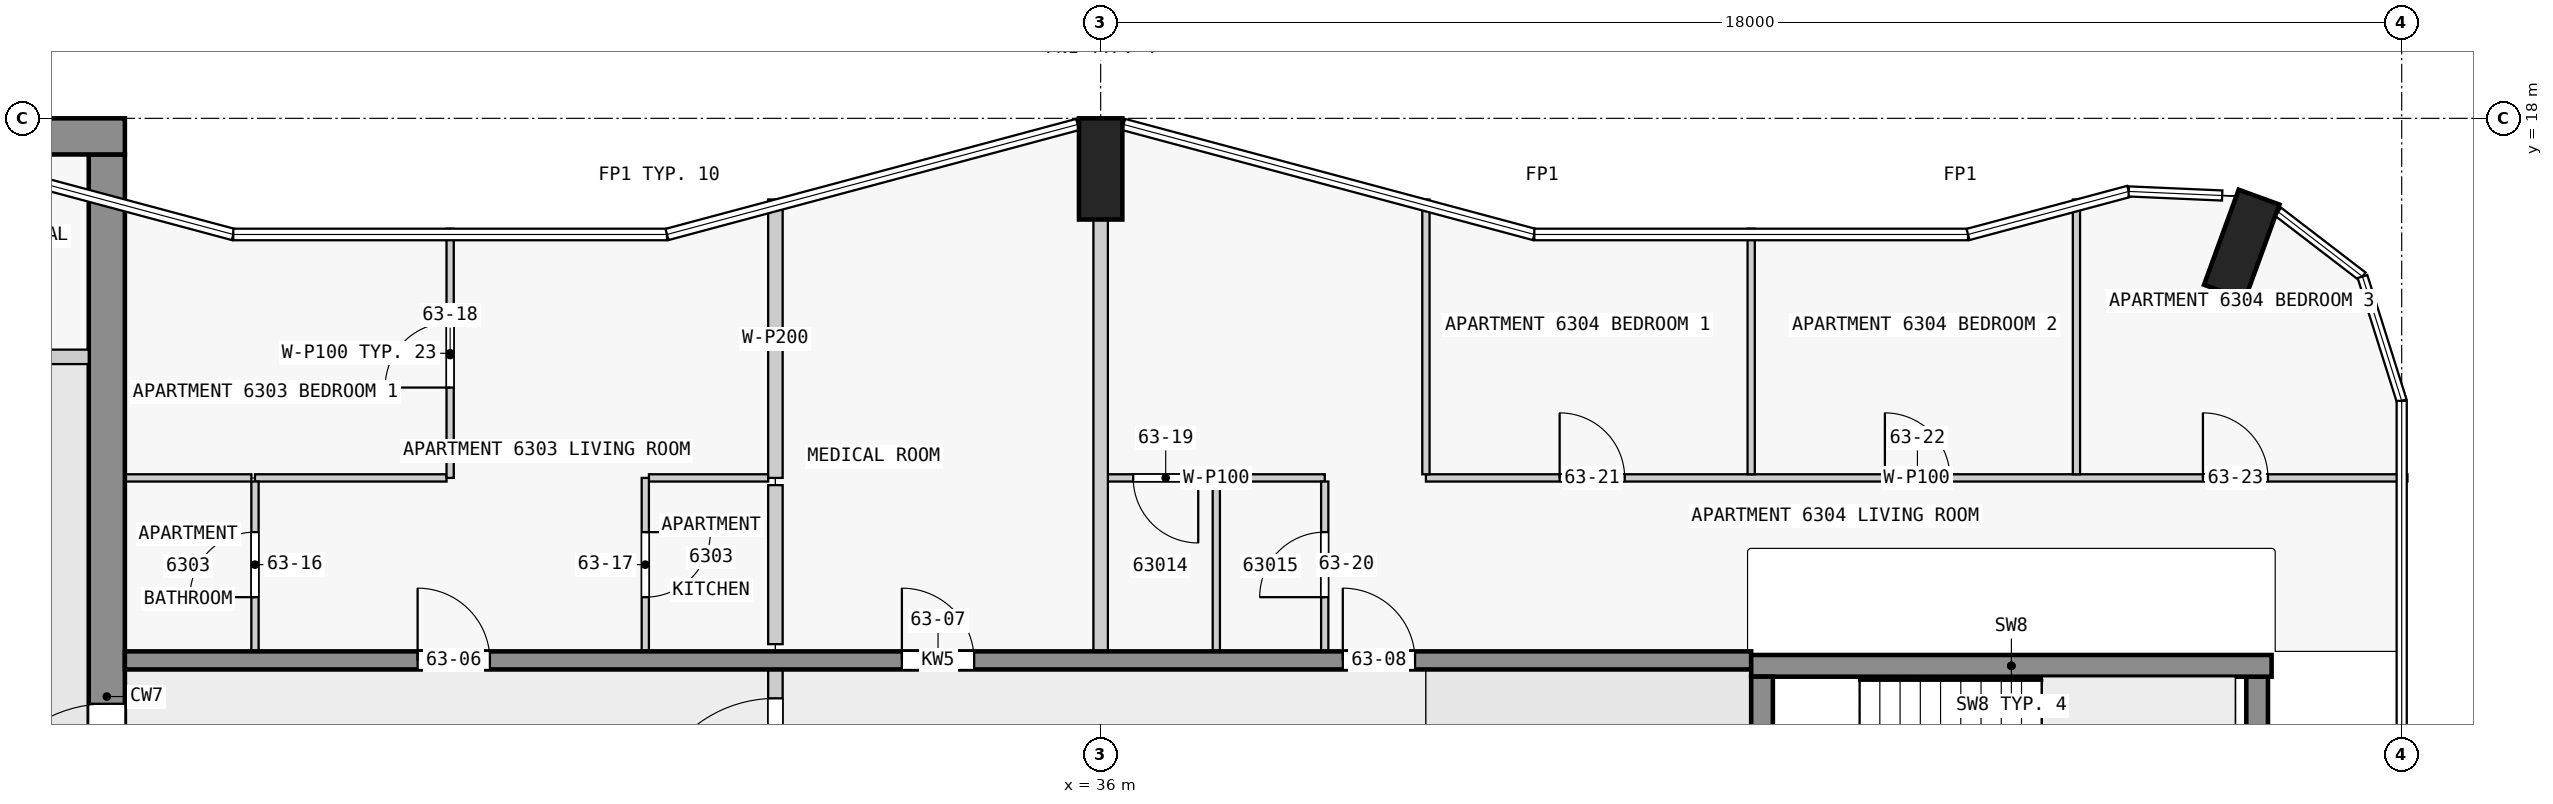
"""IFC4 building model, lengths in metres.
Left out: names, types, materials, properties, quantities, classifications, styles, units other than length and angle.
Written with IfcOpenShell. Run it as: python <this file> out.ifc"""

import sys

from ifc_helpers import new_model, si_unit, direction, frame, frame_2d, origin, origin_2d, place, context, subcontext, project, spatial, rectangle, extrude, element, fill, save


model = new_model("IFC4")
c1 = context("Model", 3, precision=1e-05, world=origin(), true_north=direction((0.0, 1.0)))
c2 = subcontext(c1, "Body", "Model", "MODEL_VIEW")
j1 = project(units=[si_unit("LENGTHUNIT", "METRE"), si_unit("PLANEANGLEUNIT", "RADIAN")], contexts=[c1])
p1 = place(None, origin())
s1 = spatial("IfcSite", under=j1, at=p1, CompositionType="ELEMENT")
p2 = place(p1, origin())
s2 = spatial("IfcBuilding", under=s1, at=p2, CompositionType="ELEMENT")
p3 = place(p2, frame((0.0, 0.0, 242.4)))
s3 = spatial("IfcBuildingStorey", under=s2, at=p3, CompositionType="ELEMENT", Elevation=242.4)
for number, where, z_axis, x_axis in (
    (1, (51.787, 16.252, 0.0), (0.0, 0.0, 1.0), (-0.94, 0.342, 0.0)),
    (2, (36.0, 17.3, 0.0), (0.0, 0.0, 1.0), (1.0, 0.0, 0.0)),
):
    element("IfcColumn", number, at=place(p3, frame(where, z_axis=z_axis, x_axis=x_axis)), inside=s3, PredefinedType="COLUMN", context=c2, shape_type="SweptSolid", body=[
        extrude(rectangle(XDim=0.6, YDim=1.4, at=origin_2d()), origin(), (0.0, 0.0, 1.0), 3.5),
    ])
p4 = place(p3, frame((1.8, 17.75, 0.0), z_axis=(0.0, 0.0, 1.0), x_axis=(1.0, 0.0, 0.0)))
e3 = element("IfcWall", 3, at=p4, inside=s3, PredefinedType="SHEAR", context=c2, shape_type="SweptSolid", body=[
    extrude(rectangle(XDim=20.7, YDim=0.5, at=frame_2d((10.35, 0.0))), origin(), (0.0, 0.0, 1.0), 3.25),
])
p5 = place(p3, frame((22.25, 2.5, 0.0), z_axis=(0.0, 0.0, 1.0), x_axis=(0.0, 1.0, 0.0)))
e4 = element("IfcWall", 4, at=p5, inside=s3, PredefinedType="SHEAR", context=c2, shape_type="SweptSolid", body=[
    extrude(rectangle(XDim=15.0, YDim=0.5, at=frame_2d((7.5, 0.0))), origin(), (0.0, 0.0, 1.0), 3.25),
])
p6 = place(p5, frame((5.6, 0.0, 0.0)))
e5 = element("IfcOpeningElement", 5, at=p6, cuts=e4, PredefinedType="OPENING", context=c2, shape_type="SweptSolid", body=[
    extrude(rectangle(XDim=1.8, YDim=2.1, at=frame_2d((0.9, 1.05))), frame((0.0, 0.26, 0.0), z_axis=(0.0, -1.0, 0.0), x_axis=(1.0, 0.0, 0.0)), (0.0, 0.0, 1.0), 0.52),
])
p7 = place(p3, frame((45.15, 7.725, 0.0), z_axis=(0.0, 0.0, 1.0), x_axis=(0.0, 1.0, 0.0)))
e6 = element("IfcWall", 6, at=p7, inside=s3, PredefinedType="SHEAR", context=c2, shape_type="SweptSolid", body=[
    extrude(rectangle(XDim=2.55, YDim=0.3, at=frame_2d((1.275, 0.0))), origin(), (0.0, 0.0, 1.0), 3.5),
])
p8 = place(p7, frame((0.725, 0.0, 0.0)))
e7 = element("IfcOpeningElement", 7, at=p8, cuts=e6, PredefinedType="OPENING", context=c2, shape_type="SweptSolid", body=[
    extrude(rectangle(XDim=1.1, YDim=2.1, at=frame_2d((0.55, 1.05))), frame((0.0, 0.16, 0.0), z_axis=(0.0, -1.0, 0.0), x_axis=(1.0, 0.0, 0.0)), (0.0, 0.0, 1.0), 0.32),
])
p9 = place(p3, frame((52.0, 7.725, 0.0), z_axis=(0.0, 0.0, 1.0), x_axis=(0.0, 1.0, 0.0)))
e8 = element("IfcWall", 8, at=p9, inside=s3, PredefinedType="SHEAR", context=c2, shape_type="SweptSolid", body=[
    extrude(rectangle(XDim=2.55, YDim=0.3, at=frame_2d((1.275, 0.0))), origin(), (0.0, 0.0, 1.0), 3.5),
])
p10 = place(p3, frame((45.0, 10.425, 0.0), z_axis=(0.0, 0.0, 1.0), x_axis=(1.0, 0.0, 0.0)))
e9 = element("IfcWall", 9, at=p10, inside=s3, PredefinedType="SHEAR", context=c2, shape_type="SweptSolid", body=[
    extrude(rectangle(XDim=7.2, YDim=0.3, at=frame_2d((3.6, 0.0))), origin(), (0.0, 0.0, 1.0), 3.5),
])
p11 = place(p3, frame((22.5, 10.5, 0.0), z_axis=(0.0, 0.0, 1.0), x_axis=(1.0, 0.0, 0.0)))
e10 = element("IfcWall", 10, at=p11, inside=s3, PredefinedType="SHEAR", context=c2, shape_type="SweptSolid", body=[
    extrude(rectangle(XDim=22.5, YDim=0.25, at=frame_2d((11.25, 0.0))), origin(), (0.0, 0.0, 1.0), 3.25),
])
p12 = place(p11, frame((4.05, 0.0, 0.0)))
e11 = element("IfcOpeningElement", 11, at=p12, cuts=e10, PredefinedType="OPENING", context=c2, shape_type="SweptSolid", body=[
    extrude(rectangle(XDim=1.0, YDim=2.1, at=frame_2d((0.5, 1.05))), frame((0.0, 0.135, 0.0), z_axis=(0.0, -1.0, 0.0), x_axis=(1.0, 0.0, 0.0)), (0.0, 0.0, 1.0), 0.27),
])
p13 = place(p11, frame((10.75, 0.0, 0.0)))
e12 = element("IfcOpeningElement", 12, at=p13, cuts=e10, PredefinedType="OPENING", context=c2, shape_type="SweptSolid", body=[
    extrude(rectangle(XDim=1.0, YDim=2.1, at=frame_2d((0.5, 1.05))), frame((0.0, 0.135, 0.0), z_axis=(0.0, -1.0, 0.0), x_axis=(1.0, 0.0, 0.0)), (0.0, 0.0, 1.0), 0.27),
])
p14 = place(p11, frame((16.85, 0.0, 0.0)))
e13 = element("IfcOpeningElement", 13, at=p14, cuts=e10, PredefinedType="OPENING", context=c2, shape_type="SweptSolid", body=[
    extrude(rectangle(XDim=1.0, YDim=2.1, at=frame_2d((0.5, 1.05))), frame((0.0, 0.135, 0.0), z_axis=(0.0, -1.0, 0.0), x_axis=(1.0, 0.0, 0.0)), (0.0, 0.0, 1.0), 0.27),
])
p15 = place(p3, frame((18.6, 14.7, 0.0), z_axis=(0.0, 0.0, 1.0), x_axis=(1.0, 0.0, 0.0)))
e14 = element("IfcWall", 14, at=p15, inside=s3, PredefinedType="PARTITIONING", context=c2, shape_type="SweptSolid", body=[
    extrude(rectangle(XDim=3.4, YDim=0.2, at=frame_2d((1.7, 0.0))), origin(), (0.0, 0.0, 1.0), 3.25),
])
p16 = place(p15, frame((0.15, 0.0, 0.0)))
e15 = element("IfcOpeningElement", 15, at=p16, cuts=e14, PredefinedType="OPENING", context=c2, shape_type="SweptSolid", body=[
    extrude(rectangle(XDim=0.9, YDim=2.1, at=frame_2d((0.45, 1.05))), frame((0.0, 0.11, 0.0), z_axis=(0.0, -1.0, 0.0), x_axis=(1.0, 0.0, 0.0)), (0.0, 0.0, 1.0), 0.22),
])
p17 = place(p15, frame((1.85, 0.0, 0.0)))
e16 = element("IfcOpeningElement", 16, at=p17, cuts=e14, PredefinedType="OPENING", context=c2, shape_type="SweptSolid", body=[
    extrude(rectangle(XDim=0.9, YDim=2.1, at=frame_2d((0.45, 1.05))), frame((0.0, 0.11, 0.0), z_axis=(0.0, -1.0, 0.0), x_axis=(1.0, 0.0, 0.0)), (0.0, 0.0, 1.0), 0.22),
])
p18 = place(p3, frame((24.25, 13.025, 0.0), z_axis=(0.0, 0.0, 1.0), x_axis=(-1.0, 0.0, 0.0)))
e17 = element("IfcWall", 17, at=p18, inside=s3, PredefinedType="PARTITIONING", context=c2, shape_type="SweptSolid", body=[
    extrude(rectangle(XDim=1.75, YDim=0.1, at=frame_2d((0.875, 0.0))), origin(), (0.0, 0.0, 1.0), 3.25),
])
p19 = place(p3, frame((31.4, 13.025, 0.0), z_axis=(0.0, 0.0, 1.0), x_axis=(-1.0, 0.0, 0.0)))
e18 = element("IfcWall", 18, at=p19, inside=s3, PredefinedType="PARTITIONING", context=c2, shape_type="SweptSolid", body=[
    extrude(rectangle(XDim=1.65, YDim=0.1, at=frame_2d((0.825, 0.0))), origin(), (0.0, 0.0, 1.0), 3.25),
])
p20 = place(p3, frame((39.1, 13.025, 0.0), z_axis=(0.0, 0.0, 1.0), x_axis=(-1.0, 0.0, 0.0)))
e19 = element("IfcWall", 19, at=p20, inside=s3, PredefinedType="PARTITIONING", context=c2, shape_type="SweptSolid", body=[
    extrude(rectangle(XDim=3.0, YDim=0.1, at=frame_2d((1.5, 0.0))), origin(), (0.0, 0.0, 1.0), 3.25),
])
p21 = place(p20, frame((1.75, 0.0, 0.0)))
e20 = element("IfcOpeningElement", 20, at=p21, cuts=e19, PredefinedType="OPENING", context=c2, shape_type="SweptSolid", body=[
    extrude(rectangle(XDim=0.9, YDim=2.1, at=frame_2d((0.45, 1.05))), frame((0.0, 0.06, 0.0), z_axis=(0.0, -1.0, 0.0), x_axis=(1.0, 0.0, 0.0)), (0.0, 0.0, 1.0), 0.12),
])
p22 = place(p3, frame((24.3, 13.025, 0.0), z_axis=(0.0, 0.0, 1.0), x_axis=(1.0, 0.0, 0.0)))
e21 = element("IfcWall", 21, at=p22, inside=s3, PredefinedType="PARTITIONING", context=c2, shape_type="SweptSolid", body=[
    extrude(rectangle(XDim=2.65, YDim=0.1, at=frame_2d((1.325, 0.0))), origin(), (0.0, 0.0, 1.0), 3.25),
])
p23 = place(p3, frame((40.5, 13.025, 0.0), z_axis=(0.0, 0.0, 1.0), x_axis=(1.0, 0.0, 0.0)))
e22 = element("IfcWall", 22, at=p23, inside=s3, PredefinedType="PARTITIONING", context=c2, shape_type="SweptSolid", body=[
    extrude(rectangle(XDim=13.58, YDim=0.1, at=frame_2d((6.79, 0.0))), origin(), (0.0, 0.0, 1.0), 3.25),
])
p24 = place(p23, frame((1.85, 0.0, 0.0)))
e23 = element("IfcOpeningElement", 23, at=p24, cuts=e22, PredefinedType="OPENING", context=c2, shape_type="SweptSolid", body=[
    extrude(rectangle(XDim=0.9, YDim=2.1, at=frame_2d((0.45, 1.05))), frame((0.0, 0.06, 0.0), z_axis=(0.0, -1.0, 0.0), x_axis=(1.0, 0.0, 0.0)), (0.0, 0.0, 1.0), 0.12),
])
p25 = place(p23, frame((6.35, 0.0, 0.0)))
e24 = element("IfcOpeningElement", 24, at=p25, cuts=e22, PredefinedType="OPENING", context=c2, shape_type="SweptSolid", body=[
    extrude(rectangle(XDim=0.9, YDim=2.1, at=frame_2d((0.45, 1.05))), frame((0.0, 0.06, 0.0), z_axis=(0.0, -1.0, 0.0), x_axis=(1.0, 0.0, 0.0)), (0.0, 0.0, 1.0), 0.12),
])
p26 = place(p23, frame((10.75, 0.0, 0.0)))
e25 = element("IfcOpeningElement", 25, at=p26, cuts=e22, PredefinedType="OPENING", context=c2, shape_type="SweptSolid", body=[
    extrude(rectangle(XDim=0.9, YDim=2.1, at=frame_2d((0.45, 1.05))), frame((0.0, 0.06, 0.0), z_axis=(0.0, -1.0, 0.0), x_axis=(1.0, 0.0, 0.0)), (0.0, 0.0, 1.0), 0.12),
])
p27 = place(p3, frame((24.3, 10.625, 0.0), z_axis=(0.0, 0.0, 1.0), x_axis=(0.0, 1.0, 0.0)))
e26 = element("IfcWall", 26, at=p27, inside=s3, PredefinedType="PARTITIONING", context=c2, shape_type="SweptSolid", body=[
    extrude(rectangle(XDim=2.35, YDim=0.1, at=frame_2d((1.175, 0.0))), origin(), (0.0, 0.0, 1.0), 3.25),
])
p28 = place(p27, frame((0.75, 0.0, 0.0)))
e27 = element("IfcOpeningElement", 27, at=p28, cuts=e26, PredefinedType="OPENING", context=c2, shape_type="SweptSolid", body=[
    extrude(rectangle(XDim=0.9, YDim=2.1, at=frame_2d((0.45, 1.05))), frame((0.0, 0.06, 0.0), z_axis=(0.0, -1.0, 0.0), x_axis=(1.0, 0.0, 0.0)), (0.0, 0.0, 1.0), 0.12),
])
p29 = place(p3, frame((27.0, 13.025, 0.0), z_axis=(0.0, 0.0, 1.0), x_axis=(0.0, 1.0, 0.0)))
e28 = element("IfcWall", 28, at=p29, inside=s3, PredefinedType="PARTITIONING", context=c2, shape_type="SweptSolid", body=[
    extrude(rectangle(XDim=3.448, YDim=0.1, at=frame_2d((1.724, 0.0))), origin(), (0.0, 0.0, 1.0), 3.25),
])
p30 = place(p29, frame((1.25, 0.0, 0.0)))
e29 = element("IfcOpeningElement", 29, at=p30, cuts=e28, PredefinedType="OPENING", context=c2, shape_type="SweptSolid", body=[
    extrude(rectangle(XDim=0.9, YDim=2.1, at=frame_2d((0.45, 1.05))), frame((0.0, 0.06, 0.0), z_axis=(0.0, -1.0, 0.0), x_axis=(1.0, 0.0, 0.0)), (0.0, 0.0, 1.0), 0.12),
])
p31 = place(p3, frame((29.7, 13.025, 0.0), z_axis=(0.0, 0.0, 1.0), x_axis=(0.0, -1.0, 0.0)))
e30 = element("IfcWall", 30, at=p31, inside=s3, PredefinedType="PARTITIONING", context=c2, shape_type="SweptSolid", body=[
    extrude(rectangle(XDim=2.4, YDim=0.1, at=frame_2d((1.2, 0.0))), origin(), (0.0, 0.0, 1.0), 3.25),
])
p32 = place(p31, frame((0.75, 0.0, 0.0)))
e31 = element("IfcOpeningElement", 31, at=p32, cuts=e30, PredefinedType="OPENING", context=c2, shape_type="SweptSolid", body=[
    extrude(rectangle(XDim=0.9, YDim=2.1, at=frame_2d((0.45, 1.05))), frame((0.0, 0.06, 0.0), z_axis=(0.0, -1.0, 0.0), x_axis=(1.0, 0.0, 0.0)), (0.0, 0.0, 1.0), 0.12),
])
p33 = place(p3, frame((31.5, 16.878, 0.0), z_axis=(0.0, 0.0, 1.0), x_axis=(0.0, -1.0, 0.0)))
e32 = element("IfcWall", 32, at=p33, inside=s3, PredefinedType="PARTITIONING", context=c2, shape_type="SweptSolid", body=[
    extrude(rectangle(XDim=3.853, YDim=0.2, at=frame_2d((1.926, 0.0))), origin(), (0.0, 0.0, 1.0), 3.25),
])
p34 = place(p3, frame((31.5, 10.725, 0.0), z_axis=(0.0, 0.0, 1.0), x_axis=(0.0, 1.0, 0.0)))
e33 = element("IfcWall", 33, at=p34, inside=s3, PredefinedType="PARTITIONING", context=c2, shape_type="SweptSolid", body=[
    extrude(rectangle(XDim=2.2, YDim=0.2, at=frame_2d((1.1, 0.0))), origin(), (0.0, 0.0, 1.0), 3.25),
])
p35 = place(p3, frame((36.0, 10.625, 0.0), z_axis=(0.0, 0.0, 1.0), x_axis=(0.0, 1.0, 0.0)))
e34 = element("IfcWall", 34, at=p35, inside=s3, PredefinedType="PARTITIONING", context=c2, shape_type="SweptSolid", body=[
    extrude(rectangle(XDim=5.975, YDim=0.2, at=frame_2d((2.988, 0.0))), origin(), (0.0, 0.0, 1.0), 3.25),
])
p36 = place(p3, frame((37.6, 10.625, 0.0), z_axis=(0.0, 0.0, 1.0), x_axis=(0.0, 1.0, 0.0)))
e35 = element("IfcWall", 35, at=p36, inside=s3, PredefinedType="PARTITIONING", context=c2, shape_type="SweptSolid", body=[
    extrude(rectangle(XDim=2.35, YDim=0.1, at=frame_2d((1.175, 0.0))), origin(), (0.0, 0.0, 1.0), 3.25),
])
p37 = place(p3, frame((39.1, 10.625, 0.0), z_axis=(0.0, 0.0, 1.0), x_axis=(0.0, 1.0, 0.0)))
e36 = element("IfcWall", 36, at=p37, inside=s3, PredefinedType="PARTITIONING", context=c2, shape_type="SweptSolid", body=[
    extrude(rectangle(XDim=2.35, YDim=0.1, at=frame_2d((1.175, 0.0))), origin(), (0.0, 0.0, 1.0), 3.25),
])
p38 = place(p37, frame((0.75, 0.0, 0.0)))
e37 = element("IfcOpeningElement", 37, at=p38, cuts=e36, PredefinedType="OPENING", context=c2, shape_type="SweptSolid", body=[
    extrude(rectangle(XDim=0.9, YDim=2.1, at=frame_2d((0.45, 1.05))), frame((0.0, 0.06, 0.0), z_axis=(0.0, -1.0, 0.0), x_axis=(1.0, 0.0, 0.0)), (0.0, 0.0, 1.0), 0.12),
])
p39 = place(p3, frame((40.5, 16.878, 0.0), z_axis=(0.0, 0.0, 1.0), x_axis=(0.0, -1.0, 0.0)))
e38 = element("IfcWall", 38, at=p39, inside=s3, PredefinedType="PARTITIONING", context=c2, shape_type="SweptSolid", body=[
    extrude(rectangle(XDim=3.803, YDim=0.1, at=frame_2d((1.901, 0.0))), origin(), (0.0, 0.0, 1.0), 3.25),
])
p40 = place(p3, frame((45.0, 13.075, 0.0), z_axis=(0.0, 0.0, 1.0), x_axis=(0.0, 1.0, 0.0)))
e39 = element("IfcWall", 39, at=p40, inside=s3, PredefinedType="PARTITIONING", context=c2, shape_type="SweptSolid", body=[
    extrude(rectangle(XDim=3.398, YDim=0.1, at=frame_2d((1.699, 0.0))), origin(), (0.0, 0.0, 1.0), 3.25),
])
p41 = place(p3, frame((49.5, 13.075, 0.0), z_axis=(0.0, 0.0, 1.0), x_axis=(0.0, 1.0, 0.0)))
e40 = element("IfcWall", 40, at=p41, inside=s3, PredefinedType="PARTITIONING", context=c2, shape_type="SweptSolid", body=[
    extrude(rectangle(XDim=3.803, YDim=0.1, at=frame_2d((1.901, 0.0))), origin(), (0.0, 0.0, 1.0), 3.25),
])
p42 = place(p3, frame((31.5, 7.475, 0.0), z_axis=(0.0, 0.0, 1.0), x_axis=(0.0, 1.0, 0.0)))
e41 = element("IfcWall", 41, at=p42, inside=s3, PredefinedType="PARTITIONING", context=c2, shape_type="SweptSolid", body=[
    extrude(rectangle(XDim=3.15, YDim=0.2, at=frame_2d((1.575, 0.0))), origin(), (0.0, 0.0, 1.0), 3.25),
])
p43 = place(p42, frame((0.7, 0.0, 0.0)))
e42 = element("IfcOpeningElement", 42, at=p43, cuts=e41, PredefinedType="OPENING", context=c2, shape_type="SweptSolid", body=[
    extrude(rectangle(XDim=1.8, YDim=2.1, at=frame_2d((0.9, 1.05))), frame((0.0, 0.11, 0.0), z_axis=(0.0, -1.0, 0.0), x_axis=(1.0, 0.0, 0.0)), (0.0, 0.0, 1.0), 0.22),
])
p44 = place(p6, origin())
e43 = element("IfcDoor", 43, at=p44, inside=s3, OperationType="DOUBLE_DOOR_SINGLE_SWING", PredefinedType="DOOR", context=c2, shape_type="SweptSolid", body=[
    extrude(rectangle(XDim=1.8, YDim=2.1, at=frame_2d((0.9, 1.05))), frame((0.0, 0.025, 0.0), z_axis=(0.0, -1.0, 0.0), x_axis=(1.0, 0.0, 0.0)), (0.0, 0.0, 1.0), 0.05),
])
fill(e5, e43)
p45 = place(p12, origin())
e44 = element("IfcDoor", 44, at=p45, inside=s3, OperationType="SINGLE_SWING_LEFT", PredefinedType="DOOR", context=c2, shape_type="SweptSolid", body=[
    extrude(rectangle(XDim=1.0, YDim=2.1, at=frame_2d((0.5, 1.05))), frame((0.0, 0.025, 0.0), z_axis=(0.0, -1.0, 0.0), x_axis=(1.0, 0.0, 0.0)), (0.0, 0.0, 1.0), 0.05),
])
fill(e11, e44)
p46 = place(p13, origin())
e45 = element("IfcDoor", 45, at=p46, inside=s3, OperationType="SINGLE_SWING_LEFT", PredefinedType="DOOR", context=c2, shape_type="SweptSolid", body=[
    extrude(rectangle(XDim=1.0, YDim=2.1, at=frame_2d((0.5, 1.05))), frame((0.0, 0.025, 0.0), z_axis=(0.0, -1.0, 0.0), x_axis=(1.0, 0.0, 0.0)), (0.0, 0.0, 1.0), 0.05),
])
fill(e12, e45)
p47 = place(p14, origin())
e46 = element("IfcDoor", 46, at=p47, inside=s3, OperationType="SINGLE_SWING_RIGHT", PredefinedType="DOOR", context=c2, shape_type="SweptSolid", body=[
    extrude(rectangle(XDim=1.0, YDim=2.1, at=frame_2d((0.5, 1.05))), frame((0.0, 0.025, 0.0), z_axis=(0.0, -1.0, 0.0), x_axis=(1.0, 0.0, 0.0)), (0.0, 0.0, 1.0), 0.05),
])
fill(e13, e46)
p48 = place(p43, origin())
e47 = element("IfcDoor", 47, at=p48, inside=s3, OperationType="SINGLE_SWING_RIGHT", PredefinedType="DOOR", context=c2, shape_type="SweptSolid", body=[
    extrude(rectangle(XDim=1.8, YDim=2.1, at=frame_2d((0.9, 1.05))), frame((0.0, 0.025, 0.0), z_axis=(0.0, -1.0, 0.0), x_axis=(1.0, 0.0, 0.0)), (0.0, 0.0, 1.0), 0.05),
])
fill(e42, e47)
p49 = place(p28, origin())
e48 = element("IfcDoor", 48, at=p49, inside=s3, OperationType="SINGLE_SWING_RIGHT", PredefinedType="DOOR", context=c2, shape_type="SweptSolid", body=[
    extrude(rectangle(XDim=0.9, YDim=2.1, at=frame_2d((0.45, 1.05))), frame((0.0, 0.025, 0.0), z_axis=(0.0, -1.0, 0.0), x_axis=(1.0, 0.0, 0.0)), (0.0, 0.0, 1.0), 0.05),
])
fill(e27, e48)
p50 = place(p32, origin())
e49 = element("IfcDoor", 49, at=p50, inside=s3, OperationType="SINGLE_SWING_LEFT", PredefinedType="DOOR", context=c2, shape_type="SweptSolid", body=[
    extrude(rectangle(XDim=0.9, YDim=2.1, at=frame_2d((0.45, 1.05))), frame((0.0, 0.025, 0.0), z_axis=(0.0, -1.0, 0.0), x_axis=(1.0, 0.0, 0.0)), (0.0, 0.0, 1.0), 0.05),
])
fill(e31, e49)
p51 = place(p30, origin())
e50 = element("IfcDoor", 50, at=p51, inside=s3, OperationType="SINGLE_SWING_LEFT", PredefinedType="DOOR", context=c2, shape_type="SweptSolid", body=[
    extrude(rectangle(XDim=0.9, YDim=2.1, at=frame_2d((0.45, 1.05))), frame((0.0, 0.025, 0.0), z_axis=(0.0, -1.0, 0.0), x_axis=(1.0, 0.0, 0.0)), (0.0, 0.0, 1.0), 0.05),
])
fill(e29, e50)
p52 = place(p21, origin())
e51 = element("IfcDoor", 51, at=p52, inside=s3, OperationType="SINGLE_SWING_RIGHT", PredefinedType="DOOR", context=c2, shape_type="SweptSolid", body=[
    extrude(rectangle(XDim=0.9, YDim=2.1, at=frame_2d((0.45, 1.05))), frame((0.0, 0.025, 0.0), z_axis=(0.0, -1.0, 0.0), x_axis=(1.0, 0.0, 0.0)), (0.0, 0.0, 1.0), 0.05),
])
fill(e20, e51)
p53 = place(p38, origin())
e52 = element("IfcDoor", 52, at=p53, inside=s3, OperationType="SINGLE_SWING_RIGHT", PredefinedType="DOOR", context=c2, shape_type="SweptSolid", body=[
    extrude(rectangle(XDim=0.9, YDim=2.1, at=frame_2d((0.45, 1.05))), frame((0.0, 0.025, 0.0), z_axis=(0.0, -1.0, 0.0), x_axis=(1.0, 0.0, 0.0)), (0.0, 0.0, 1.0), 0.05),
])
fill(e37, e52)
p54 = place(p24, origin())
e53 = element("IfcDoor", 53, at=p54, inside=s3, OperationType="SINGLE_SWING_LEFT", PredefinedType="DOOR", context=c2, shape_type="SweptSolid", body=[
    extrude(rectangle(XDim=0.9, YDim=2.1, at=frame_2d((0.45, 1.05))), frame((0.0, 0.025, 0.0), z_axis=(0.0, -1.0, 0.0), x_axis=(1.0, 0.0, 0.0)), (0.0, 0.0, 1.0), 0.05),
])
fill(e23, e53)
p55 = place(p25, origin())
e54 = element("IfcDoor", 54, at=p55, inside=s3, OperationType="SINGLE_SWING_RIGHT", PredefinedType="DOOR", context=c2, shape_type="SweptSolid", body=[
    extrude(rectangle(XDim=0.9, YDim=2.1, at=frame_2d((0.45, 1.05))), frame((0.0, 0.025, 0.0), z_axis=(0.0, -1.0, 0.0), x_axis=(1.0, 0.0, 0.0)), (0.0, 0.0, 1.0), 0.05),
])
fill(e24, e54)
p56 = place(p26, origin())
e55 = element("IfcDoor", 55, at=p56, inside=s3, OperationType="SINGLE_SWING_RIGHT", PredefinedType="DOOR", context=c2, shape_type="SweptSolid", body=[
    extrude(rectangle(XDim=0.9, YDim=2.1, at=frame_2d((0.45, 1.05))), frame((0.0, 0.025, 0.0), z_axis=(0.0, -1.0, 0.0), x_axis=(1.0, 0.0, 0.0)), (0.0, 0.0, 1.0), 0.05),
])
fill(e25, e55)
save(model, sys.argv[1])
